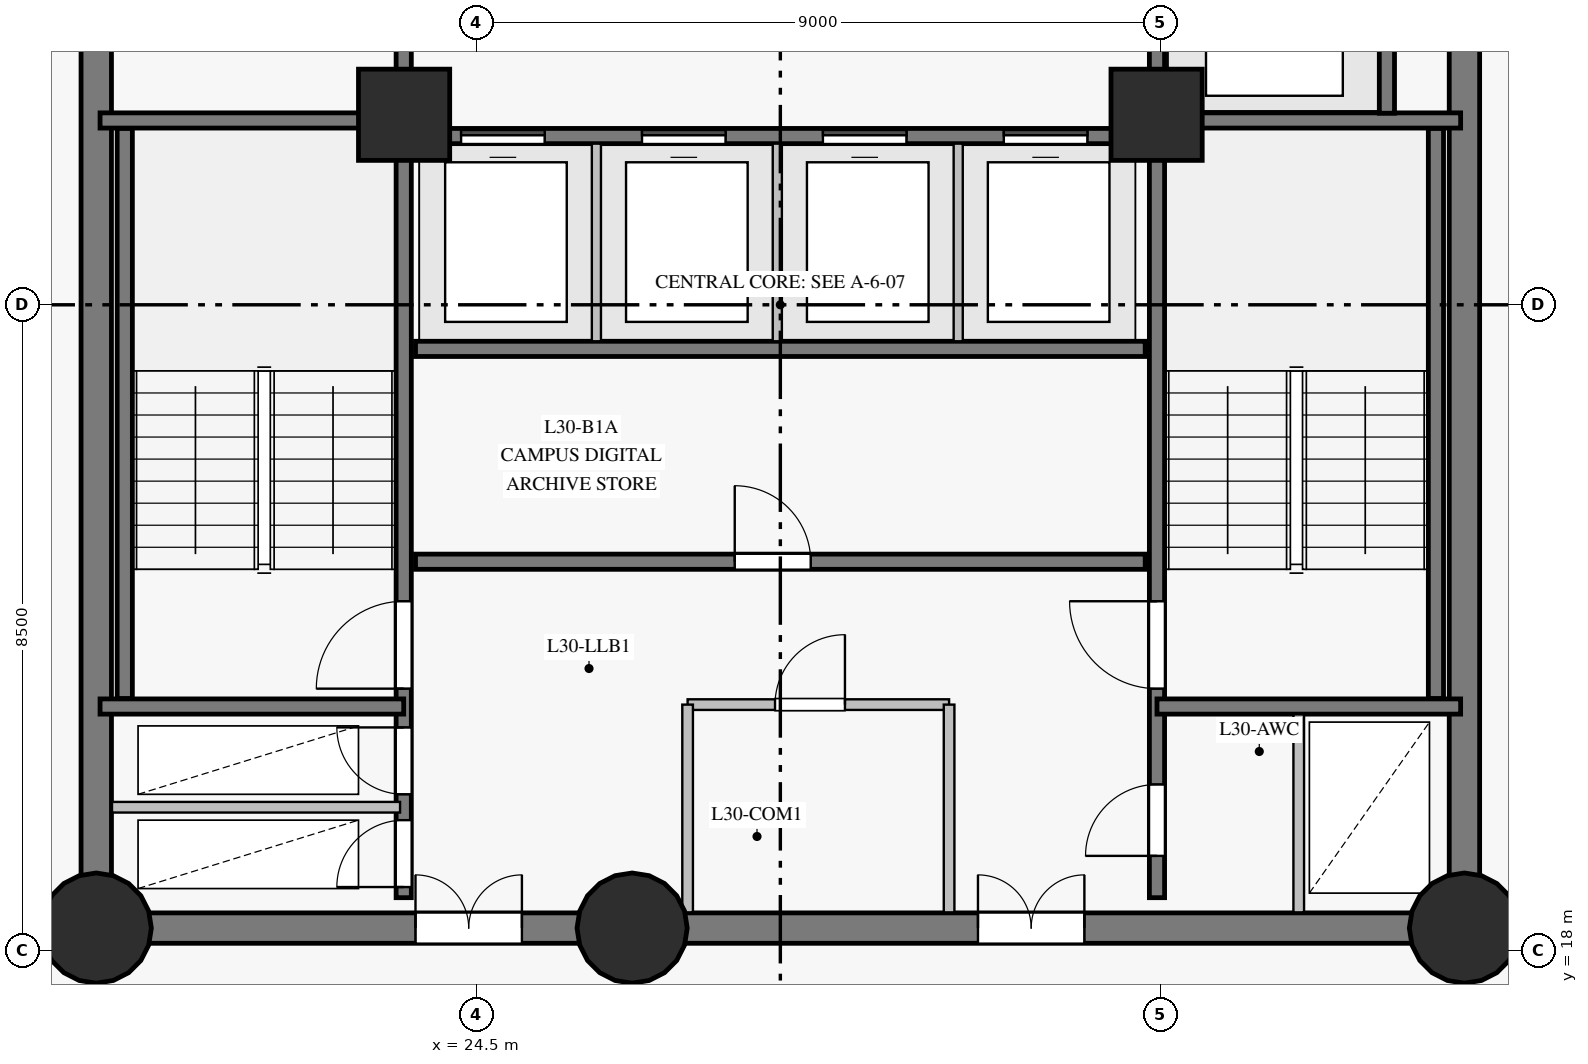
"""IFC4 building model, lengths in metres.
Left out: names, types, materials, properties, quantities, classifications, styles, units other than length and angle.
Written with IfcOpenShell. Run it as: python <this file> out.ifc"""

import sys

from ifc_helpers import new_model, si_unit, direction, frame, frame_2d, origin, origin_with_axes, origin_2d, place, context, subcontext, project, spatial, rectangle, circle, extrude, source, transform, mapped, element, fill, save


model = new_model("IFC4")
c1 = context("Model", 3, precision=1e-05, world=origin(), true_north=direction((0.0, 1.0)))
c2 = subcontext(c1, "Body", "Model", "MODEL_VIEW")
j1 = project(units=[si_unit("LENGTHUNIT", "METRE"), si_unit("PLANEANGLEUNIT", "RADIAN")], contexts=[c1])
p1 = place(None, origin())
s1 = spatial("IfcSite", under=j1, at=p1, CompositionType="ELEMENT")
p2 = place(p1, origin())
s2 = spatial("IfcBuilding", under=s1, at=p2, CompositionType="ELEMENT")
p3 = place(p2, frame((0.0, 0.0, 111.45)))
s3 = spatial("IfcBuildingStorey", under=s2, at=p3, CompositionType="ELEMENT", Elevation=111.45)
p4 = place(p3, frame((19.5, 18.3, 0.0), z_axis=(0.0, 0.0, 1.0), x_axis=(1.0, 0.0, 0.0)))
e1 = element("IfcWall", 1, at=p4, inside=s3, PredefinedType="SHEAR", context=c2, shape_type="SweptSolid", body=[
    extrude(rectangle(XDim=7.05, YDim=0.4, at=frame_2d((3.525, 0.0))), origin(), (0.0, 0.0, 1.0), 2.825),
])
p5 = place(p4, frame((4.2, 0.0, 0.0)))
e2 = element("IfcOpeningElement", 2, at=p5, cuts=e1, PredefinedType="OPENING", context=c2, shape_type="SweptSolid", body=[
    extrude(rectangle(XDim=1.4, YDim=2.2, at=frame_2d((0.7, 1.1))), frame((0.0, 0.21, 0.0), z_axis=(0.0, -1.0, 0.0), x_axis=(1.0, 0.0, 0.0)), (0.0, 0.0, 1.0), 0.42),
])
p6 = place(p3, frame((26.55, 18.3, 0.0), z_axis=(0.0, 0.0, 1.0), x_axis=(1.0, 0.0, 0.0)))
e3 = element("IfcWall", 3, at=p6, inside=s3, PredefinedType="SHEAR", context=c2, shape_type="SweptSolid", body=[
    extrude(rectangle(XDim=10.95, YDim=0.4, at=frame_2d((5.475, 0.0))), origin(), (0.0, 0.0, 1.0), 2.825),
])
p7 = place(p6, frame((4.55, 0.0, 0.0)))
e4 = element("IfcOpeningElement", 4, at=p7, cuts=e3, PredefinedType="OPENING", context=c2, shape_type="SweptSolid", body=[
    extrude(rectangle(XDim=1.4, YDim=2.2, at=frame_2d((0.7, 1.1))), frame((0.0, 0.21, 0.0), z_axis=(0.0, -1.0, 0.0), x_axis=(1.0, 0.0, 0.0)), (0.0, 0.0, 1.0), 0.42),
])
p8 = place(p3, frame((37.5, 18.3, 0.0), z_axis=(0.0, 0.0, 1.0), x_axis=(0.0, 1.0, 0.0)))
e5 = element("IfcWall", 5, at=p8, inside=s3, PredefinedType="SHEAR", context=c2, shape_type="SweptSolid", body=[
    extrude(rectangle(XDim=16.4, YDim=0.4, at=frame_2d((8.2, 0.0))), origin(), (0.0, 0.0, 1.0), 2.825),
])
p9 = place(p8, frame((14.15, 0.0, 0.0)))
e6 = element("IfcOpeningElement", 6, at=p9, cuts=e5, PredefinedType="OPENING", context=c2, shape_type="SweptSolid", body=[
    extrude(rectangle(XDim=1.2, YDim=2.15, at=frame_2d((0.6, 1.075))), frame((0.0, 0.21, 0.0), z_axis=(0.0, -1.0, 0.0), x_axis=(1.0, 0.0, 0.0)), (0.0, 0.0, 1.0), 0.42),
])
p10 = place(p3, frame((19.5, 34.7, 0.0), z_axis=(0.0, 0.0, 1.0), x_axis=(0.0, -1.0, 0.0)))
e7 = element("IfcWall", 7, at=p10, inside=s3, PredefinedType="SHEAR", context=c2, shape_type="SweptSolid", body=[
    extrude(rectangle(XDim=16.4, YDim=0.4, at=frame_2d((8.2, 0.0))), origin(), (0.0, 0.0, 1.0), 2.825),
])
p11 = place(p10, frame((3.1, 0.0, 0.0)))
e8 = element("IfcOpeningElement", 8, at=p11, cuts=e7, PredefinedType="OPENING", context=c2, shape_type="SweptSolid", body=[
    extrude(rectangle(XDim=1.1, YDim=2.15, at=frame_2d((0.55, 1.075))), frame((0.0, 0.21, 0.0), z_axis=(0.0, -1.0, 0.0), x_axis=(1.0, 0.0, 0.0)), (0.0, 0.0, 1.0), 0.42),
])
m1 = source(origin_with_axes(), c2, "Body", "SweptSolid", [
    extrude(circle(Radius=0.725, at=origin_2d()), origin(), (0.0, 0.0, 1.0), 3.05),
])
for number, where, z_axis, x_axis in (
    (9, (19.5, 18.3, 0.0), (0.0, 0.0, 1.0), (1.0, 0.0, 0.0)),
    (10, (26.55, 18.3, 0.0), (0.0, 0.0, 1.0), (1.0, 0.0, 0.0)),
    (11, (37.5, 18.3, 0.0), (0.0, 0.0, 1.0), (1.0, 0.0, 0.0)),
):
    element("IfcColumn", number, at=place(p3, frame(where, z_axis=z_axis, x_axis=x_axis)), inside=s3, PredefinedType="COLUMN", context=c2, shape_type="MappedRepresentation", body=[
        mapped(m1, transform((0.0, 0.0, 0.0), scale=1.0)),
    ])
m2 = source(origin_with_axes(), c2, "Body", "SweptSolid", [
    extrude(rectangle(XDim=1.2, YDim=1.2, at=origin_2d()), origin(), (0.0, 0.0, 1.0), 3.05),
])
for number, where, z_axis, x_axis in (
    (12, (23.55, 29.0, 0.0), (0.0, 0.0, 1.0), (1.0, 0.0, 0.0)),
    (13, (33.45, 29.0, 0.0), (0.0, 0.0, 1.0), (1.0, 0.0, 0.0)),
):
    element("IfcColumn", number, at=place(p3, frame(where, z_axis=z_axis, x_axis=x_axis)), inside=s3, PredefinedType="COLUMN", context=c2, shape_type="MappedRepresentation", body=[
        mapped(m2, transform((0.0, 0.0, 0.0), scale=1.0)),
    ])
p12 = place(p3, frame((23.545, 18.7, 0.0), z_axis=(0.0, 0.0, 1.0), x_axis=(0.0, 1.0, 0.0)))
e14 = element("IfcWall", 14, at=p12, inside=s3, PredefinedType="SHEAR", context=c2, shape_type="SweptSolid", body=[
    extrude(rectangle(XDim=15.6, YDim=0.2, at=frame_2d((7.8, 0.0))), origin(), (0.0, 0.0, 1.0), 2.825),
])
p13 = place(p12, frame((2.75, 0.0, 0.0)))
e15 = element("IfcOpeningElement", 15, at=p13, cuts=e14, PredefinedType="OPENING", context=c2, shape_type="SweptSolid", body=[
    extrude(rectangle(XDim=1.15, YDim=2.15, at=frame_2d((0.575, 1.075))), frame((0.0, 0.11, 0.0), z_axis=(0.0, -1.0, 0.0), x_axis=(1.0, 0.0, 0.0)), (0.0, 0.0, 1.0), 0.22),
])
p14 = place(p12, frame((0.14, 0.0, 0.0)))
e16 = element("IfcOpeningElement", 16, at=p14, cuts=e14, PredefinedType="OPENING", context=c2, shape_type="SweptSolid", body=[
    extrude(rectangle(XDim=0.88, YDim=2.1, at=frame_2d((0.44, 1.05))), frame((0.0, 0.11, 0.0), z_axis=(0.0, -1.0, 0.0), x_axis=(1.0, 0.0, 0.0)), (0.0, 0.0, 1.0), 0.22),
])
p15 = place(p12, frame((1.36, 0.0, 0.0)))
e17 = element("IfcOpeningElement", 17, at=p15, cuts=e14, PredefinedType="OPENING", context=c2, shape_type="SweptSolid", body=[
    extrude(rectangle(XDim=0.88, YDim=2.1, at=frame_2d((0.44, 1.05))), frame((0.0, 0.11, 0.0), z_axis=(0.0, -1.0, 0.0), x_axis=(1.0, 0.0, 0.0)), (0.0, 0.0, 1.0), 0.22),
])
p16 = place(p12, frame((12.1, 0.0, 0.0)))
e18 = element("IfcOpeningElement", 18, at=p16, cuts=e14, PredefinedType="OPENING", context=c2, shape_type="SweptSolid", body=[
    extrude(rectangle(XDim=1.12, YDim=2.15, at=frame_2d((0.56, 1.075))), frame((0.0, 0.11, 0.0), z_axis=(0.0, -1.0, 0.0), x_axis=(1.0, 0.0, 0.0)), (0.0, 0.0, 1.0), 0.22),
])
p17 = place(p12, frame((14.05, 0.0, 0.0)))
e19 = element("IfcOpeningElement", 19, at=p17, cuts=e14, PredefinedType="OPENING", context=c2, shape_type="SweptSolid", body=[
    extrude(rectangle(XDim=1.12, YDim=2.15, at=frame_2d((0.56, 1.075))), frame((0.0, 0.11, 0.0), z_axis=(0.0, -1.0, 0.0), x_axis=(1.0, 0.0, 0.0)), (0.0, 0.0, 1.0), 0.22),
])
p18 = place(p3, frame((33.455, 18.7, 0.0), z_axis=(0.0, 0.0, 1.0), x_axis=(0.0, 1.0, 0.0)))
e20 = element("IfcWall", 20, at=p18, inside=s3, PredefinedType="SHEAR", context=c2, shape_type="SweptSolid", body=[
    extrude(rectangle(XDim=15.6, YDim=0.2, at=frame_2d((7.8, 0.0))), origin(), (0.0, 0.0, 1.0), 2.825),
])
p19 = place(p18, frame((2.75, 0.0, 0.0)))
e21 = element("IfcOpeningElement", 21, at=p19, cuts=e20, PredefinedType="OPENING", context=c2, shape_type="SweptSolid", body=[
    extrude(rectangle(XDim=1.15, YDim=2.15, at=frame_2d((0.575, 1.075))), frame((0.0, 0.11, 0.0), z_axis=(0.0, -1.0, 0.0), x_axis=(1.0, 0.0, 0.0)), (0.0, 0.0, 1.0), 0.22),
])
p20 = place(p18, frame((0.55, 0.0, 0.0)))
e22 = element("IfcOpeningElement", 22, at=p20, cuts=e20, PredefinedType="OPENING", context=c2, shape_type="SweptSolid", body=[
    extrude(rectangle(XDim=0.94, YDim=2.1, at=frame_2d((0.47, 1.05))), frame((0.0, 0.11, 0.0), z_axis=(0.0, -1.0, 0.0), x_axis=(1.0, 0.0, 0.0)), (0.0, 0.0, 1.0), 0.22),
])
p21 = place(p3, frame((23.7, 23.12, 0.0), z_axis=(0.0, 0.0, 1.0), x_axis=(1.0, 0.0, 0.0)))
e23 = element("IfcWall", 23, at=p21, inside=s3, PredefinedType="SHEAR", context=c2, shape_type="SweptSolid", body=[
    extrude(rectangle(XDim=9.6, YDim=0.2, at=frame_2d((4.8, 0.0))), origin(), (0.0, 0.0, 1.0), 2.825),
])
p22 = place(p21, frame((4.2, 0.0, 0.0)))
e24 = element("IfcOpeningElement", 24, at=p22, cuts=e23, PredefinedType="OPENING", context=c2, shape_type="SweptSolid", body=[
    extrude(rectangle(XDim=1.0, YDim=2.15, at=frame_2d((0.5, 1.075))), frame((0.0, 0.11, 0.0), z_axis=(0.0, -1.0, 0.0), x_axis=(1.0, 0.0, 0.0)), (0.0, 0.0, 1.0), 0.22),
])
p23 = place(p3, frame((23.7, 25.92, 0.0), z_axis=(0.0, 0.0, 1.0), x_axis=(1.0, 0.0, 0.0)))
e25 = element("IfcWall", 25, at=p23, inside=s3, PredefinedType="SHEAR", context=c2, shape_type="SweptSolid", body=[
    extrude(rectangle(XDim=9.6, YDim=0.2, at=frame_2d((4.8, 0.0))), origin(), (0.0, 0.0, 1.0), 2.825),
])
p24 = place(p3, frame((23.7, 28.72, 0.0), z_axis=(0.0, 0.0, 1.0), x_axis=(1.0, 0.0, 0.0)))
e26 = element("IfcWall", 26, at=p24, inside=s3, PredefinedType="SHEAR", context=c2, shape_type="SweptSolid", body=[
    extrude(rectangle(XDim=9.6, YDim=0.2, at=frame_2d((4.8, 0.0))), origin(), (0.0, 0.0, 1.0), 2.825),
])
p25 = place(p24, frame((0.6, 0.0, 0.0)))
e27 = element("IfcOpeningElement", 27, at=p25, cuts=e26, PredefinedType="OPENING", context=c2, shape_type="SweptSolid", body=[
    extrude(rectangle(XDim=1.1, YDim=2.15, at=frame_2d((0.55, 1.075))), frame((0.0, 0.11, 0.0), z_axis=(0.0, -1.0, 0.0), x_axis=(1.0, 0.0, 0.0)), (0.0, 0.0, 1.0), 0.22),
])
p26 = place(p24, frame((2.98, 0.0, 0.0)))
e28 = element("IfcOpeningElement", 28, at=p26, cuts=e26, PredefinedType="OPENING", context=c2, shape_type="SweptSolid", body=[
    extrude(rectangle(XDim=1.1, YDim=2.15, at=frame_2d((0.55, 1.075))), frame((0.0, 0.11, 0.0), z_axis=(0.0, -1.0, 0.0), x_axis=(1.0, 0.0, 0.0)), (0.0, 0.0, 1.0), 0.22),
])
p27 = place(p24, frame((5.36, 0.0, 0.0)))
e29 = element("IfcOpeningElement", 29, at=p27, cuts=e26, PredefinedType="OPENING", context=c2, shape_type="SweptSolid", body=[
    extrude(rectangle(XDim=1.1, YDim=2.15, at=frame_2d((0.55, 1.075))), frame((0.0, 0.11, 0.0), z_axis=(0.0, -1.0, 0.0), x_axis=(1.0, 0.0, 0.0)), (0.0, 0.0, 1.0), 0.22),
])
p28 = place(p24, frame((7.74, 0.0, 0.0)))
e30 = element("IfcOpeningElement", 30, at=p28, cuts=e26, PredefinedType="OPENING", context=c2, shape_type="SweptSolid", body=[
    extrude(rectangle(XDim=1.1, YDim=2.15, at=frame_2d((0.55, 1.075))), frame((0.0, 0.11, 0.0), z_axis=(0.0, -1.0, 0.0), x_axis=(1.0, 0.0, 0.0)), (0.0, 0.0, 1.0), 0.22),
])
for number, where, z_axis, x_axis in (
    (31, (19.875, 21.32, 0.0), (0.0, 0.0, 1.0), (0.0, 1.0, 0.0)),
    (32, (37.125, 21.32, 0.0), (0.0, 0.0, 1.0), (0.0, 1.0, 0.0)),
):
    element("IfcWall", number, at=place(p3, frame(where, z_axis=z_axis, x_axis=x_axis)), inside=s3, PredefinedType="SHEAR", context=c2, shape_type="SweptSolid", body=[
        extrude(rectangle(XDim=7.5, YDim=0.2, at=frame_2d((3.75, 0.0))), origin(), (0.0, 0.0, 1.0), 2.825),
    ])
for number, where, z_axis, x_axis in (
    (33, (33.455, 21.215, 0.0), (0.0, 0.0, 1.0), (1.0, 0.0, 0.0)),
    (34, (33.455, 28.925, 0.0), (0.0, 0.0, 1.0), (1.0, 0.0, 0.0)),
    (35, (19.55, 21.215, 0.0), (0.0, 0.0, 1.0), (1.0, 0.0, 0.0)),
    (36, (19.55, 28.925, 0.0), (0.0, 0.0, 1.0), (1.0, 0.0, 0.0)),
):
    element("IfcWall", number, at=place(p3, frame(where, z_axis=z_axis, x_axis=x_axis)), inside=s3, PredefinedType="SHEAR", context=c2, shape_type="SweptSolid", body=[
        extrude(rectangle(XDim=3.995, YDim=0.2, at=frame_2d((1.998, 0.0))), origin(), (0.0, 0.0, 1.0), 2.825),
    ])
p29 = place(p3, frame((36.48, 29.02, 0.0), z_axis=(0.0, 0.0, 1.0), x_axis=(0.0, 1.0, 0.0)))
e37 = element("IfcWall", 37, at=p29, inside=s3, PredefinedType="SHEAR", context=c2, shape_type="SweptSolid", body=[
    extrude(rectangle(XDim=2.86, YDim=0.2, at=frame_2d((1.43, 0.0))), origin(), (0.0, 0.0, 1.0), 2.825),
])
p30 = place(p3, frame((19.707, 19.89, 0.0), z_axis=(0.0, 0.0, 1.0), x_axis=(1.0, 0.0, 0.0)))
e38 = element("IfcWall", 38, at=p30, inside=s3, PredefinedType="PARTITIONING", context=c2, shape_type="SweptSolid", body=[
    extrude(rectangle(XDim=3.79, YDim=0.14, at=frame_2d((1.895, 0.0))), origin(), (0.0, 0.0, 1.0), 2.825),
])
p31 = place(p3, frame((27.28, 21.24, 0.0), z_axis=(0.0, 0.0, 1.0), x_axis=(1.0, 0.0, 0.0)))
e39 = element("IfcWall", 39, at=p31, inside=s3, PredefinedType="PARTITIONING", context=c2, shape_type="SweptSolid", body=[
    extrude(rectangle(XDim=3.44, YDim=0.14, at=frame_2d((1.72, 0.0))), origin(), (0.0, 0.0, 1.0), 2.825),
])
p32 = place(p31, frame((1.15, 0.0, 0.0)))
e40 = element("IfcOpeningElement", 40, at=p32, cuts=e39, PredefinedType="OPENING", context=c2, shape_type="SweptSolid", body=[
    extrude(rectangle(XDim=0.92, YDim=2.1, at=frame_2d((0.46, 1.05))), frame((0.0, 0.08, 0.0), z_axis=(0.0, -1.0, 0.0), x_axis=(1.0, 0.0, 0.0)), (0.0, 0.0, 1.0), 0.16),
])
for number, where, z_axis, x_axis in (
    (41, (27.28, 18.507, 0.0), (0.0, 0.0, 1.0), (0.0, 1.0, 0.0)),
    (42, (30.72, 18.507, 0.0), (0.0, 0.0, 1.0), (0.0, 1.0, 0.0)),
):
    element("IfcWall", number, at=place(p3, frame(where, z_axis=z_axis, x_axis=x_axis)), inside=s3, PredefinedType="PARTITIONING", context=c2, shape_type="SweptSolid", body=[
        extrude(rectangle(XDim=2.733, YDim=0.14, at=frame_2d((1.366, 0.0))), origin(), (0.0, 0.0, 1.0), 2.825),
    ])
for number, where, z_axis, x_axis in (
    (43, (26.08, 26.02, 0.0), (0.0, 0.0, 1.0), (0.0, 1.0, 0.0)),
    (44, (28.46, 26.02, 0.0), (0.0, 0.0, 1.0), (0.0, 1.0, 0.0)),
    (45, (30.84, 26.02, 0.0), (0.0, 0.0, 1.0), (0.0, 1.0, 0.0)),
):
    element("IfcWall", number, at=place(p3, frame(where, z_axis=z_axis, x_axis=x_axis)), inside=s3, PredefinedType="PARTITIONING", context=c2, shape_type="SweptSolid", body=[
        extrude(rectangle(XDim=2.6, YDim=0.12, at=frame_2d((1.3, 0.0))), origin(), (0.0, 0.0, 1.0), 2.825),
    ])
p33 = place(p3, frame((35.32, 18.507, 0.0), z_axis=(0.0, 0.0, 1.0), x_axis=(0.0, 1.0, 0.0)))
e46 = element("IfcWall", 46, at=p33, inside=s3, PredefinedType="PARTITIONING", context=c2, shape_type="SweptSolid", body=[
    extrude(rectangle(XDim=2.604, YDim=0.14, at=frame_2d((1.302, 0.0))), origin(), (0.0, 0.0, 1.0), 2.825),
])
m3 = source(origin_with_axes(), c2, "Body", "SweptSolid", [
    extrude(rectangle(XDim=1.15, YDim=2.15, at=frame_2d((0.575, 1.075))), frame((0.0, 0.025, 0.0), z_axis=(0.0, -1.0, 0.0), x_axis=(1.0, 0.0, 0.0)), (0.0, 0.0, 1.0), 0.05),
])
p34 = place(p13, origin())
e47 = element("IfcDoor", 47, at=p34, inside=s3, OperationType="SINGLE_SWING_LEFT", PredefinedType="DOOR", context=c2, shape_type="MappedRepresentation", body=[
    mapped(m3, transform((0.0, 0.0, 0.0), scale=1.0)),
])
fill(e15, e47)
p35 = place(p19, origin())
e48 = element("IfcDoor", 48, at=p35, inside=s3, OperationType="SINGLE_SWING_RIGHT", PredefinedType="DOOR", context=c2, shape_type="MappedRepresentation", body=[
    mapped(m3, transform((0.0, 0.0, 0.0), scale=1.0)),
])
fill(e21, e48)
m4 = source(origin_with_axes(), c2, "Body", "SweptSolid", [
    extrude(rectangle(XDim=0.88, YDim=2.1, at=frame_2d((0.44, 1.05))), frame((0.0, 0.025, 0.0), z_axis=(0.0, -1.0, 0.0), x_axis=(1.0, 0.0, 0.0)), (0.0, 0.0, 1.0), 0.05),
])
p36 = place(p14, origin())
e49 = element("IfcDoor", 49, at=p36, inside=s3, OperationType="SINGLE_SWING_LEFT", PredefinedType="DOOR", context=c2, shape_type="MappedRepresentation", body=[
    mapped(m4, transform((0.0, 0.0, 0.0), scale=1.0)),
])
fill(e16, e49)
p37 = place(p15, origin())
e50 = element("IfcDoor", 50, at=p37, inside=s3, OperationType="SINGLE_SWING_RIGHT", PredefinedType="DOOR", context=c2, shape_type="MappedRepresentation", body=[
    mapped(m4, transform((0.0, 0.0, 0.0), scale=1.0)),
])
fill(e17, e50)
m5 = source(origin_with_axes(), c2, "Body", "SweptSolid", [
    extrude(rectangle(XDim=1.4, YDim=2.2, at=frame_2d((0.7, 1.1))), frame((0.0, 0.025, 0.0), z_axis=(0.0, -1.0, 0.0), x_axis=(1.0, 0.0, 0.0)), (0.0, 0.0, 1.0), 0.05),
])
p38 = place(p5, origin())
e51 = element("IfcDoor", 51, at=p38, inside=s3, OperationType="DOUBLE_DOOR_SINGLE_SWING", PredefinedType="DOOR", context=c2, shape_type="MappedRepresentation", body=[
    mapped(m5, transform((0.0, 0.0, 0.0), scale=1.0)),
])
fill(e2, e51)
p39 = place(p7, origin())
e52 = element("IfcDoor", 52, at=p39, inside=s3, OperationType="DOUBLE_DOOR_SINGLE_SWING", PredefinedType="DOOR", context=c2, shape_type="MappedRepresentation", body=[
    mapped(m5, transform((0.0, 0.0, 0.0), scale=1.0)),
])
fill(e4, e52)
m6 = source(origin_with_axes(), c2, "Body", "SweptSolid", [
    extrude(rectangle(XDim=0.94, YDim=2.1, at=frame_2d((0.47, 1.05))), frame((0.0, 0.025, 0.0), z_axis=(0.0, -1.0, 0.0), x_axis=(1.0, 0.0, 0.0)), (0.0, 0.0, 1.0), 0.05),
])
p40 = place(p20, origin())
e53 = element("IfcDoor", 53, at=p40, inside=s3, OperationType="SINGLE_SWING_LEFT", PredefinedType="DOOR", context=c2, shape_type="MappedRepresentation", body=[
    mapped(m6, transform((0.0, 0.0, 0.0), scale=1.0)),
])
fill(e22, e53)
m7 = source(origin_with_axes(), c2, "Body", "SweptSolid", [
    extrude(rectangle(XDim=0.92, YDim=2.1, at=frame_2d((0.46, 1.05))), frame((0.0, 0.025, 0.0), z_axis=(0.0, -1.0, 0.0), x_axis=(1.0, 0.0, 0.0)), (0.0, 0.0, 1.0), 0.05),
])
p41 = place(p32, origin())
e54 = element("IfcDoor", 54, at=p41, inside=s3, OperationType="SINGLE_SWING_RIGHT", PredefinedType="DOOR", context=c2, shape_type="MappedRepresentation", body=[
    mapped(m7, transform((0.0, 0.0, 0.0), scale=1.0)),
])
fill(e40, e54)
m8 = source(origin_with_axes(), c2, "Body", "SweptSolid", [
    extrude(rectangle(XDim=1.0, YDim=2.15, at=frame_2d((0.5, 1.075))), frame((0.0, 0.025, 0.0), z_axis=(0.0, -1.0, 0.0), x_axis=(1.0, 0.0, 0.0)), (0.0, 0.0, 1.0), 0.05),
])
p42 = place(p22, origin())
e55 = element("IfcDoor", 55, at=p42, inside=s3, OperationType="SINGLE_SWING_LEFT", PredefinedType="DOOR", context=c2, shape_type="MappedRepresentation", body=[
    mapped(m8, transform((0.0, 0.0, 0.0), scale=1.0)),
])
fill(e24, e55)
m9 = source(origin_with_axes(), c2, "Body", "SweptSolid", [
    extrude(rectangle(XDim=1.1, YDim=2.15, at=frame_2d((0.55, 1.075))), frame((0.0, 0.025, 0.0), z_axis=(0.0, -1.0, 0.0), x_axis=(1.0, 0.0, 0.0)), (0.0, 0.0, 1.0), 0.05),
])
p43 = place(p25, origin())
e56 = element("IfcDoor", 56, at=p43, inside=s3, OperationType="SLIDING_TO_LEFT", PredefinedType="DOOR", context=c2, shape_type="MappedRepresentation", body=[
    mapped(m9, transform((0.0, 0.0, 0.0), scale=1.0)),
])
fill(e27, e56)
p44 = place(p26, origin())
e57 = element("IfcDoor", 57, at=p44, inside=s3, OperationType="SLIDING_TO_RIGHT", PredefinedType="DOOR", context=c2, shape_type="MappedRepresentation", body=[
    mapped(m9, transform((0.0, 0.0, 0.0), scale=1.0)),
])
fill(e28, e57)
p45 = place(p27, origin())
e58 = element("IfcDoor", 58, at=p45, inside=s3, OperationType="SLIDING_TO_LEFT", PredefinedType="DOOR", context=c2, shape_type="MappedRepresentation", body=[
    mapped(m9, transform((0.0, 0.0, 0.0), scale=1.0)),
])
fill(e29, e58)
p46 = place(p28, origin())
e59 = element("IfcDoor", 59, at=p46, inside=s3, OperationType="SLIDING_TO_RIGHT", PredefinedType="DOOR", context=c2, shape_type="MappedRepresentation", body=[
    mapped(m9, transform((0.0, 0.0, 0.0), scale=1.0)),
])
fill(e30, e59)
save(model, sys.argv[1])
